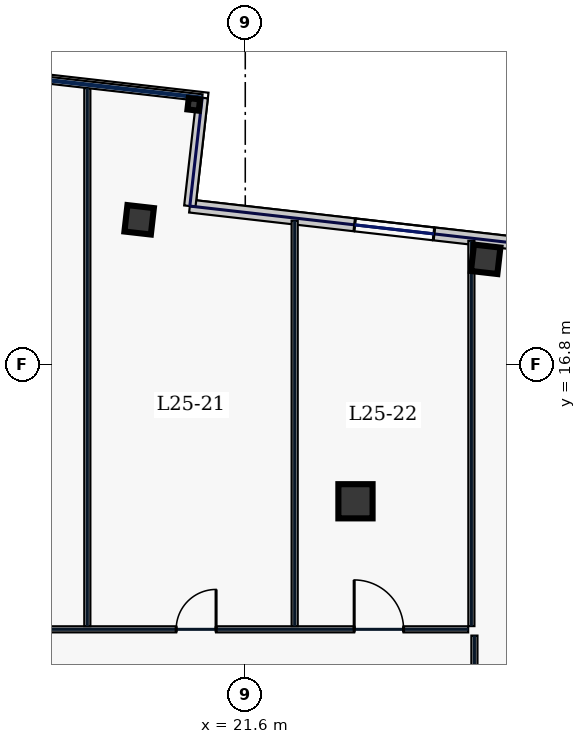
"""IFC4 building model, lengths in metres.
Left out: names, types, materials, properties, quantities, classifications, styles, units other than length and angle.
Written with IfcOpenShell. Run it as: python <this file> out.ifc"""

import sys

from ifc_helpers import new_model, si_unit, direction, frame, frame_2d, origin, origin_2d, place, context, subcontext, project, spatial, rectangle, hollow_rectangle, extrude, element, fill, save


model = new_model("IFC4")
c1 = context("Model", 3, precision=1e-05, world=origin(), true_north=direction((0.0, 1.0)))
c2 = subcontext(c1, "Body", "Model", "MODEL_VIEW")
j1 = project(units=[si_unit("LENGTHUNIT", "METRE"), si_unit("PLANEANGLEUNIT", "RADIAN")], contexts=[c1])
p1 = place(None, origin())
s1 = spatial("IfcSite", under=j1, at=p1, CompositionType="ELEMENT")
p2 = place(p1, origin())
s2 = spatial("IfcBuilding", under=s1, at=p2, CompositionType="ELEMENT")
p3 = place(p2, frame((0.0, 0.0, 113.4)))
s3 = spatial("IfcBuildingStorey", under=s2, at=p3, CompositionType="ELEMENT", Elevation=113.4)
p4 = place(p3, frame((24.5, 13.2, 0.0), z_axis=(0.0, 0.0, 1.0), x_axis=(1.0, 0.0, 0.0)))
e1 = element("IfcColumn", 1, at=p4, inside=s3, PredefinedType="COLUMN", context=c2, shape_type="SweptSolid", body=[
    extrude(hollow_rectangle(XDim=0.9, YDim=0.9, WallThickness=0.04, at=origin_2d()), origin(), (0.0, 0.0, 1.0), 3.74),
])
for number, where, z_axis, x_axis in (
    (2, (27.926, 19.568, 0.0), (0.0, 0.0, 1.0), (0.994, -0.113, 0.0)),
    (3, (18.808, 20.607, 0.0), (0.0, 0.0, 1.0), (0.994, -0.113, 0.0)),
):
    element("IfcColumn", number, at=place(p3, frame(where, z_axis=z_axis, x_axis=x_axis)), inside=s3, PredefinedType="COLUMN", context=c2, shape_type="SweptSolid", body=[
        extrude(hollow_rectangle(XDim=0.7, YDim=0.7, WallThickness=0.032, at=origin_2d()), origin(), (0.0, 0.0, 1.0), 3.74),
    ])
p5 = place(p3, frame((20.245, 23.644, 0.0), z_axis=(0.0, 0.0, 1.0), x_axis=(0.993571855677, -0.113203213768, 0.0)))
e4 = element("IfcColumn", 4, at=p5, inside=s3, PredefinedType="COLUMN", context=c2, shape_type="SweptSolid", body=[
    extrude(hollow_rectangle(XDim=0.3, YDim=0.3, WallThickness=0.016, at=origin_2d()), origin(), (0.0, 0.0, 1.0), 3.74),
])
p6 = place(p3, frame((37.777, 18.958, 0.0), z_axis=(0.0, 0.0, 1.0), x_axis=(-0.993570699365, 0.113213362125, 0.0)))
e5 = element("IfcWall", 5, at=p6, inside=s3, PredefinedType="STANDARD", context=c2, shape_type="SweptSolid", body=[
    extrude(rectangle(XDim=17.75, YDim=0.34, at=frame_2d((8.875, 0.0))), origin(), (0.0, 0.0, 1.0), 3.74),
])
p7 = place(p6, frame((11.285, 0.0, 0.67)))
e6 = element("IfcOpeningElement", 6, at=p7, cuts=e5, PredefinedType="OPENING", context=c2, shape_type="SweptSolid", body=[
    extrude(rectangle(XDim=2.1, YDim=2.2, at=frame_2d((1.05, 1.1))), frame((0.0, 0.18, 0.0), z_axis=(0.0, -1.0, 0.0), x_axis=(1.0, 0.0, 0.0)), (0.0, 0.0, 1.0), 0.36),
])
p8 = place(p6, frame((6.336, 0.0, 0.67)))
e7 = element("IfcOpeningElement", 7, at=p8, cuts=e5, PredefinedType="OPENING", context=c2, shape_type="SweptSolid", body=[
    extrude(rectangle(XDim=2.1, YDim=2.2, at=frame_2d((1.05, 1.1))), frame((0.0, 0.18, 0.0), z_axis=(0.0, -1.0, 0.0), x_axis=(1.0, 0.0, 0.0)), (0.0, 0.0, 1.0), 0.36),
])
p9 = place(p6, frame((2.125, 0.0, 0.67)))
e8 = element("IfcOpeningElement", 8, at=p9, cuts=e5, PredefinedType="OPENING", context=c2, shape_type="SweptSolid", body=[
    extrude(rectangle(XDim=2.1, YDim=2.2, at=frame_2d((1.05, 1.1))), frame((0.0, 0.18, 0.0), z_axis=(0.0, -1.0, 0.0), x_axis=(1.0, 0.0, 0.0)), (0.0, 0.0, 1.0), 0.36),
])
p10 = place(p3, frame((20.141, 20.968, 0.0), z_axis=(0.0, 0.0, 1.0), x_axis=(0.113222704107, 0.993569634839, 0.0)))
e9 = element("IfcWall", 9, at=p10, inside=s3, PredefinedType="STANDARD", context=c2, shape_type="SweptSolid", body=[
    extrude(rectangle(XDim=2.87, YDim=0.3, at=frame_2d((1.435, 0.0))), origin(), (0.0, 0.0, 1.0), 1.535),
])
p11 = place(p3, frame((-27.465, 9.83, 0.0), z_axis=(0.0, 0.0, 1.0), x_axis=(1.0, 0.0, 0.0)))
e10 = element("IfcWall", 10, at=p11, inside=s3, PredefinedType="PARTITIONING", context=c2, shape_type="SweptSolid", body=[
    extrude(rectangle(XDim=54.93, YDim=0.16, at=frame_2d((27.465, 0.0))), origin(), (0.0, 0.0, 1.0), 3.74),
])
p12 = place(p11, frame((2.044, 0.0, 0.0)))
e11 = element("IfcOpeningElement", 11, at=p12, cuts=e10, PredefinedType="OPENING", context=c2, shape_type="SweptSolid", body=[
    extrude(rectangle(XDim=0.95, YDim=2.2, at=frame_2d((0.475, 1.1))), frame((0.0, 0.09, 0.0), z_axis=(0.0, -1.0, 0.0), x_axis=(1.0, 0.0, 0.0)), (0.0, 0.0, 1.0), 0.18),
])
p13 = place(p11, frame((7.275, 0.0, 0.0)))
e12 = element("IfcOpeningElement", 12, at=p13, cuts=e10, PredefinedType="OPENING", context=c2, shape_type="SweptSolid", body=[
    extrude(rectangle(XDim=0.95, YDim=2.2, at=frame_2d((0.475, 1.1))), frame((0.0, 0.09, 0.0), z_axis=(0.0, -1.0, 0.0), x_axis=(1.0, 0.0, 0.0)), (0.0, 0.0, 1.0), 0.18),
])
p14 = place(p11, frame((13.025, 0.0, 0.0)))
e13 = element("IfcOpeningElement", 13, at=p14, cuts=e10, PredefinedType="OPENING", context=c2, shape_type="SweptSolid", body=[
    extrude(rectangle(XDim=1.05, YDim=2.2, at=frame_2d((0.525, 1.1))), frame((0.0, 0.09, 0.0), z_axis=(0.0, -1.0, 0.0), x_axis=(1.0, 0.0, 0.0)), (0.0, 0.0, 1.0), 0.18),
])
p15 = place(p11, frame((19.075, 0.0, 0.0)))
e14 = element("IfcOpeningElement", 14, at=p15, cuts=e10, PredefinedType="OPENING", context=c2, shape_type="SweptSolid", body=[
    extrude(rectangle(XDim=1.3, YDim=2.2, at=frame_2d((0.65, 1.1))), frame((0.0, 0.09, 0.0), z_axis=(0.0, -1.0, 0.0), x_axis=(1.0, 0.0, 0.0)), (0.0, 0.0, 1.0), 0.18),
])
p16 = place(p11, frame((25.775, 0.0, 0.0)))
e15 = element("IfcOpeningElement", 15, at=p16, cuts=e10, PredefinedType="OPENING", context=c2, shape_type="SweptSolid", body=[
    extrude(rectangle(XDim=1.45, YDim=2.2, at=frame_2d((0.725, 1.1))), frame((0.0, 0.09, 0.0), z_axis=(0.0, -1.0, 0.0), x_axis=(1.0, 0.0, 0.0)), (0.0, 0.0, 1.0), 0.18),
])
p17 = place(p11, frame((33.444, 0.0, 0.0)))
e16 = element("IfcOpeningElement", 16, at=p17, cuts=e10, PredefinedType="OPENING", context=c2, shape_type="SweptSolid", body=[
    extrude(rectangle(XDim=1.3, YDim=2.2, at=frame_2d((0.65, 1.1))), frame((0.0, 0.09, 0.0), z_axis=(0.0, -1.0, 0.0), x_axis=(1.0, 0.0, 0.0)), (0.0, 0.0, 1.0), 0.18),
])
p18 = place(p11, frame((41.341, 0.0, 0.0)))
e17 = element("IfcOpeningElement", 17, at=p18, cuts=e10, PredefinedType="OPENING", context=c2, shape_type="SweptSolid", body=[
    extrude(rectangle(XDim=0.95, YDim=2.2, at=frame_2d((0.475, 1.1))), frame((0.0, 0.09, 0.0), z_axis=(0.0, -1.0, 0.0), x_axis=(1.0, 0.0, 0.0)), (0.0, 0.0, 1.0), 0.18),
])
p19 = place(p11, frame((47.247, 0.0, 0.0)))
e18 = element("IfcOpeningElement", 18, at=p19, cuts=e10, PredefinedType="OPENING", context=c2, shape_type="SweptSolid", body=[
    extrude(rectangle(XDim=1.05, YDim=2.2, at=frame_2d((0.525, 1.1))), frame((0.0, 0.09, 0.0), z_axis=(0.0, -1.0, 0.0), x_axis=(1.0, 0.0, 0.0)), (0.0, 0.0, 1.0), 0.18),
])
p20 = place(p11, frame((51.931, 0.0, 0.0)))
e19 = element("IfcOpeningElement", 19, at=p20, cuts=e10, PredefinedType="OPENING", context=c2, shape_type="SweptSolid", body=[
    extrude(rectangle(XDim=1.3, YDim=2.2, at=frame_2d((0.65, 1.1))), frame((0.0, 0.09, 0.0), z_axis=(0.0, -1.0, 0.0), x_axis=(1.0, 0.0, 0.0)), (0.0, 0.0, 1.0), 0.18),
])
p21 = place(p3, frame((27.63, 9.665, 0.0), z_axis=(0.0, 0.0, 1.0), x_axis=(0.0, -1.0, 0.0)))
e20 = element("IfcWall", 20, at=p21, inside=s3, PredefinedType="PARTITIONING", context=c2, shape_type="SweptSolid", body=[
    extrude(rectangle(XDim=19.28, YDim=0.16, at=frame_2d((9.64, 0.0))), origin(), (0.0, 0.0, 1.0), 3.74),
])
p22 = place(p21, frame((16.531, 0.0, 0.0)))
e21 = element("IfcOpeningElement", 21, at=p22, cuts=e20, PredefinedType="OPENING", context=c2, shape_type="SweptSolid", body=[
    extrude(rectangle(XDim=0.95, YDim=2.2, at=frame_2d((0.475, 1.1))), frame((0.0, 0.09, 0.0), z_axis=(0.0, -1.0, 0.0), x_axis=(1.0, 0.0, 0.0)), (0.0, 0.0, 1.0), 0.18),
])
p23 = place(p21, frame((11.875, 0.0, 0.0)))
e22 = element("IfcOpeningElement", 22, at=p23, cuts=e20, PredefinedType="OPENING", context=c2, shape_type="SweptSolid", body=[
    extrude(rectangle(XDim=0.95, YDim=2.2, at=frame_2d((0.475, 1.1))), frame((0.0, 0.09, 0.0), z_axis=(0.0, -1.0, 0.0), x_axis=(1.0, 0.0, 0.0)), (0.0, 0.0, 1.0), 0.18),
])
p24 = place(p21, frame((6.675, 0.0, 0.0)))
e23 = element("IfcOpeningElement", 23, at=p24, cuts=e20, PredefinedType="OPENING", context=c2, shape_type="SweptSolid", body=[
    extrude(rectangle(XDim=0.95, YDim=2.2, at=frame_2d((0.475, 1.1))), frame((0.0, 0.09, 0.0), z_axis=(0.0, -1.0, 0.0), x_axis=(1.0, 0.0, 0.0)), (0.0, 0.0, 1.0), 0.18),
])
p25 = place(p21, frame((1.994, 0.0, 0.0)))
e24 = element("IfcOpeningElement", 24, at=p25, cuts=e20, PredefinedType="OPENING", context=c2, shape_type="SweptSolid", body=[
    extrude(rectangle(XDim=0.95, YDim=2.2, at=frame_2d((0.475, 1.1))), frame((0.0, 0.09, 0.0), z_axis=(0.0, -1.0, 0.0), x_axis=(1.0, 0.0, 0.0)), (0.0, 0.0, 1.0), 0.18),
])
p26 = place(p3, frame((27.55, 9.915, 0.0), z_axis=(0.0, 0.0, 1.0), x_axis=(0.0, 1.0, 0.0)))
e25 = element("IfcWall", 25, at=p26, inside=s3, PredefinedType="PARTITIONING", context=c2, shape_type="SweptSolid", body=[
    extrude(rectangle(XDim=10.138, YDim=0.16, at=frame_2d((5.069, 0.0))), origin(), (0.0, 0.0, 1.0), 3.74),
])
p27 = place(p3, frame((22.9, 9.915, 0.0), z_axis=(0.0, 0.0, 1.0), x_axis=(0.0, 1.0, 0.0)))
e26 = element("IfcWall", 26, at=p27, inside=s3, PredefinedType="PARTITIONING", context=c2, shape_type="SweptSolid", body=[
    extrude(rectangle(XDim=10.668, YDim=0.16, at=frame_2d((5.334, 0.0))), origin(), (0.0, 0.0, 1.0), 3.74),
])
p28 = place(p3, frame((17.444, 9.915, 0.0), z_axis=(0.0, 0.0, 1.0), x_axis=(0.0, 1.0, 0.0)))
e27 = element("IfcWall", 27, at=p28, inside=s3, PredefinedType="PARTITIONING", context=c2, shape_type="SweptSolid", body=[
    extrude(rectangle(XDim=14.158, YDim=0.16, at=frame_2d((7.079, 0.0))), origin(), (0.0, 0.0, 1.0), 3.74),
])
p29 = place(p7, origin())
e28 = element("IfcWindow", 28, at=p29, inside=s3, PartitioningType="SINGLE_PANEL", PredefinedType="WINDOW", context=c2, shape_type="SweptSolid", body=[
    extrude(rectangle(XDim=2.1, YDim=2.2, at=frame_2d((1.05, 1.1))), frame((0.0, 0.03, 0.0), z_axis=(0.0, -1.0, 0.0), x_axis=(1.0, 0.0, 0.0)), (0.0, 0.0, 1.0), 0.06),
])
fill(e6, e28)
p30 = place(p19, origin())
e29 = element("IfcDoor", 29, at=p30, inside=s3, OperationType="SINGLE_SWING_RIGHT", PredefinedType="DOOR", context=c2, shape_type="SweptSolid", body=[
    extrude(rectangle(XDim=1.05, YDim=2.2, at=frame_2d((0.525, 1.1))), frame((0.0, 0.025, 0.0), z_axis=(0.0, -1.0, 0.0), x_axis=(1.0, 0.0, 0.0)), (0.0, 0.0, 1.0), 0.05),
])
fill(e18, e29)
p31 = place(p20, origin())
e30 = element("IfcDoor", 30, at=p31, inside=s3, OperationType="SINGLE_SWING_LEFT", PredefinedType="DOOR", context=c2, shape_type="SweptSolid", body=[
    extrude(rectangle(XDim=1.3, YDim=2.2, at=frame_2d((0.65, 1.1))), frame((0.0, 0.025, 0.0), z_axis=(0.0, -1.0, 0.0), x_axis=(1.0, 0.0, 0.0)), (0.0, 0.0, 1.0), 0.05),
])
fill(e19, e30)
save(model, sys.argv[1])
